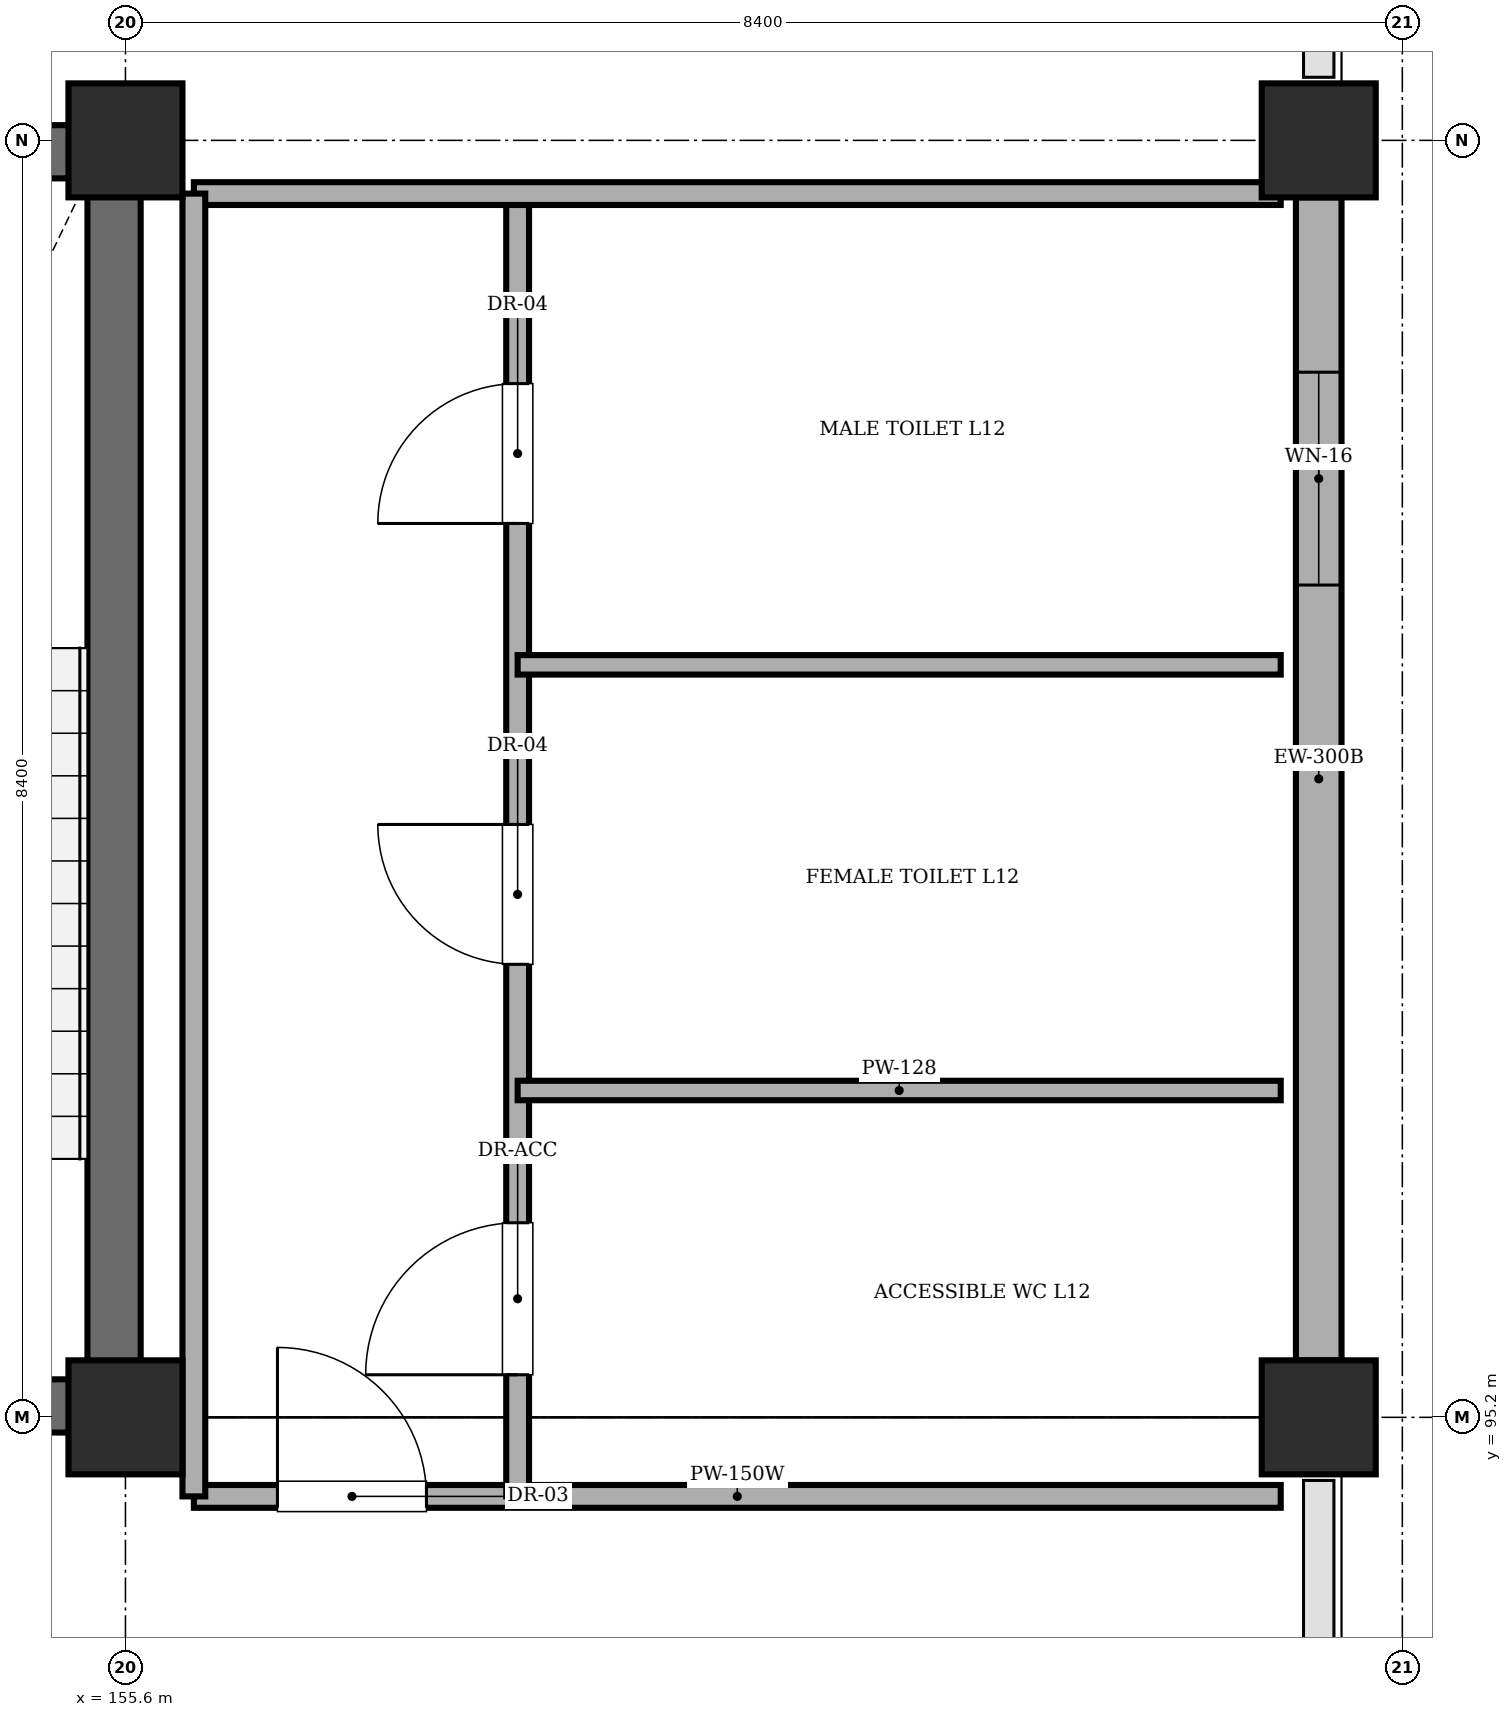
"""IFC4 building model, lengths in metres.
Left out: names, types, materials, properties, quantities, classifications, styles, units other than length and angle.
Written with IfcOpenShell. Run it as: python <this file> out.ifc"""

import sys

from ifc_helpers import new_model, si_unit, direction, frame, frame_2d, origin, origin_2d, place, context, subcontext, project, spatial, rectangle, extrude, element, fill, save


model = new_model("IFC4")
c1 = context("Model", 3, precision=1e-05, world=origin(), true_north=direction((0.0, 1.0)))
c2 = subcontext(c1, "Body", "Model", "MODEL_VIEW")
j1 = project(units=[si_unit("LENGTHUNIT", "METRE"), si_unit("PLANEANGLEUNIT", "RADIAN")], contexts=[c1])
p1 = place(None, origin())
s1 = spatial("IfcSite", under=j1, at=p1, CompositionType="ELEMENT")
p2 = place(p1, origin())
s2 = spatial("IfcBuilding", under=s1, at=p2, CompositionType="ELEMENT")
p3 = place(p2, frame((0.0, 0.0, 48.6)))
s3 = spatial("IfcBuildingStorey", under=s2, at=p3, CompositionType="ELEMENT", Elevation=48.6)
for number, where, z_axis, x_axis in (
    (1, (155.6, 95.2, 0.0), (0.0, 0.0, 1.0), (1.0, 0.0, 0.0)),
    (2, (155.6, 103.6, 0.0), (0.0, 0.0, 1.0), (1.0, 0.0, 0.0)),
    (3, (163.45, 95.2, 0.0), (0.0, 0.0, 1.0), (1.0, 0.0, 0.0)),
    (4, (163.45, 103.6, 0.0), (0.0, 0.0, 1.0), (1.0, 0.0, 0.0)),
):
    element("IfcColumn", number, at=place(p3, frame(where, z_axis=z_axis, x_axis=x_axis)), inside=s3, PredefinedType="COLUMN", context=c2, shape_type="SweptSolid", body=[
        extrude(rectangle(XDim=0.75, YDim=0.75, at=origin_2d()), origin(), (0.0, 0.0, 1.0), 4.03),
    ])
for number, where, z_axis, x_axis in (
    (5, (151.9, 95.275, 0.0), (0.0, 0.0, 1.0), (1.0, 0.0, 0.0)),
    (6, (151.9, 103.525, 0.0), (0.0, 0.0, 1.0), (1.0, 0.0, 0.0)),
):
    element("IfcWall", number, at=place(p3, frame(where, z_axis=z_axis, x_axis=x_axis)), inside=s3, PredefinedType="SHEAR", context=c2, shape_type="SweptSolid", body=[
        extrude(rectangle(XDim=3.8, YDim=0.35, at=frame_2d((1.9, 0.0))), origin(), (0.0, 0.0, 1.0), 4.03),
    ])
p4 = place(p3, frame((155.525, 95.45, 0.0), z_axis=(0.0, 0.0, 1.0), x_axis=(0.0, 1.0, 0.0)))
e7 = element("IfcWall", 7, at=p4, inside=s3, PredefinedType="SHEAR", context=c2, shape_type="SweptSolid", body=[
    extrude(rectangle(XDim=7.9, YDim=0.35, at=frame_2d((3.95, 0.0))), origin(), (0.0, 0.0, 1.0), 4.03),
])
p5 = place(p3, frame((163.45, 103.225, 0.0), z_axis=(0.0, 0.0, 1.0), x_axis=(0.0, -1.0, 0.0)))
e8 = element("IfcWall", 8, at=p5, inside=s3, PredefinedType="STANDARD", context=c2, shape_type="SweptSolid", body=[
    extrude(rectangle(XDim=7.65, YDim=0.3, at=frame_2d((3.825, 0.0))), origin(), (0.0, 0.0, 1.0), 3.33),
])
p6 = place(p5, frame((1.15, 0.0, 1.1)))
e9 = element("IfcOpeningElement", 9, at=p6, cuts=e8, PredefinedType="OPENING", context=c2, shape_type="SweptSolid", body=[
    extrude(rectangle(XDim=1.4, YDim=1.4, at=frame_2d((0.7, 0.7))), frame((0.0, 0.16, 0.0), z_axis=(0.0, -1.0, 0.0), x_axis=(1.0, 0.0, 0.0)), (0.0, 0.0, 1.0), 0.32),
])
p7 = place(p3, frame((156.05, 94.68, 0.0), z_axis=(0.0, 0.0, 1.0), x_axis=(1.0, 0.0, 0.0)))
e10 = element("IfcWall", 10, at=p7, inside=s3, PredefinedType="PARTITIONING", context=c2, shape_type="SweptSolid", body=[
    extrude(rectangle(XDim=7.15, YDim=0.15, at=frame_2d((3.575, 0.0))), origin(), (0.0, 0.0, 1.0), 4.03),
])
p8 = place(p7, frame((0.55, 0.0, 0.0)))
e11 = element("IfcOpeningElement", 11, at=p8, cuts=e10, PredefinedType="OPENING", context=c2, shape_type="SweptSolid", body=[
    extrude(rectangle(XDim=0.98, YDim=2.12, at=frame_2d((0.49, 1.06))), frame((0.0, 0.085, 0.0), z_axis=(0.0, -1.0, 0.0), x_axis=(1.0, 0.0, 0.0)), (0.0, 0.0, 1.0), 0.17),
])
p9 = place(p3, frame((158.18, 94.68, 0.0), z_axis=(0.0, 0.0, 1.0), x_axis=(0.0, 1.0, 0.0)))
e12 = element("IfcWall", 12, at=p9, inside=s3, PredefinedType="PARTITIONING", context=c2, shape_type="SweptSolid", body=[
    extrude(rectangle(XDim=8.57, YDim=0.15, at=frame_2d((4.285, 0.0))), origin(), (0.0, 0.0, 1.0), 4.03),
])
p10 = place(p9, frame((0.8, 0.0, 0.0)))
e13 = element("IfcOpeningElement", 13, at=p10, cuts=e12, PredefinedType="OPENING", context=c2, shape_type="SweptSolid", body=[
    extrude(rectangle(XDim=1.0, YDim=2.12, at=frame_2d((0.5, 1.06))), frame((0.0, 0.085, 0.0), z_axis=(0.0, -1.0, 0.0), x_axis=(1.0, 0.0, 0.0)), (0.0, 0.0, 1.0), 0.17),
])
p11 = place(p9, frame((3.5, 0.0, 0.0)))
e14 = element("IfcOpeningElement", 14, at=p11, cuts=e12, PredefinedType="OPENING", context=c2, shape_type="SweptSolid", body=[
    extrude(rectangle(XDim=0.92, YDim=2.1, at=frame_2d((0.46, 1.05))), frame((0.0, 0.085, 0.0), z_axis=(0.0, -1.0, 0.0), x_axis=(1.0, 0.0, 0.0)), (0.0, 0.0, 1.0), 0.17),
])
p12 = place(p9, frame((6.4, 0.0, 0.0)))
e15 = element("IfcOpeningElement", 15, at=p12, cuts=e12, PredefinedType="OPENING", context=c2, shape_type="SweptSolid", body=[
    extrude(rectangle(XDim=0.92, YDim=2.1, at=frame_2d((0.46, 1.05))), frame((0.0, 0.085, 0.0), z_axis=(0.0, -1.0, 0.0), x_axis=(1.0, 0.0, 0.0)), (0.0, 0.0, 1.0), 0.17),
])
for number, where, z_axis, x_axis in (
    (16, (158.18, 97.35, 0.0), (0.0, 0.0, 1.0), (1.0, 0.0, 0.0)),
    (17, (158.18, 100.15, 0.0), (0.0, 0.0, 1.0), (1.0, 0.0, 0.0)),
):
    element("IfcWall", number, at=place(p3, frame(where, z_axis=z_axis, x_axis=x_axis)), inside=s3, PredefinedType="PARTITIONING", context=c2, shape_type="SweptSolid", body=[
        extrude(rectangle(XDim=5.02, YDim=0.128, at=frame_2d((2.51, 0.0))), origin(), (0.0, 0.0, 1.0), 4.03),
    ])
p13 = place(p3, frame((156.05, 103.25, 0.0), z_axis=(0.0, 0.0, 1.0), x_axis=(1.0, 0.0, 0.0)))
e18 = element("IfcWall", 18, at=p13, inside=s3, PredefinedType="PARTITIONING", context=c2, shape_type="SweptSolid", body=[
    extrude(rectangle(XDim=7.15, YDim=0.15, at=frame_2d((3.575, 0.0))), origin(), (0.0, 0.0, 1.0), 4.03),
])
p14 = place(p3, frame((156.05, 94.68, 0.0), z_axis=(0.0, 0.0, 1.0), x_axis=(0.0, 1.0, 0.0)))
e19 = element("IfcWall", 19, at=p14, inside=s3, PredefinedType="PARTITIONING", context=c2, shape_type="SweptSolid", body=[
    extrude(rectangle(XDim=8.57, YDim=0.15, at=frame_2d((4.285, 0.0))), origin(), (0.0, 0.0, 1.0), 4.03),
])
p15 = place(p6, origin())
e20 = element("IfcWindow", 20, at=p15, inside=s3, PartitioningType="SINGLE_PANEL", PredefinedType="WINDOW", context=c2, shape_type="SweptSolid", body=[
    extrude(rectangle(XDim=1.4, YDim=1.4, at=frame_2d((0.7, 0.7))), frame((0.0, 0.03, 0.0), z_axis=(0.0, -1.0, 0.0), x_axis=(1.0, 0.0, 0.0)), (0.0, 0.0, 1.0), 0.06),
])
fill(e9, e20)
p16 = place(p8, origin())
e21 = element("IfcDoor", 21, at=p16, inside=s3, OperationType="SINGLE_SWING_LEFT", PredefinedType="DOOR", context=c2, shape_type="SweptSolid", body=[
    extrude(rectangle(XDim=0.98, YDim=2.12, at=frame_2d((0.49, 1.06))), frame((0.0, 0.025, 0.0), z_axis=(0.0, -1.0, 0.0), x_axis=(1.0, 0.0, 0.0)), (0.0, 0.0, 1.0), 0.05),
])
fill(e11, e21)
p17 = place(p10, origin())
e22 = element("IfcDoor", 22, at=p17, inside=s3, OperationType="SINGLE_SWING_LEFT", PredefinedType="DOOR", context=c2, shape_type="SweptSolid", body=[
    extrude(rectangle(XDim=1.0, YDim=2.12, at=frame_2d((0.5, 1.06))), frame((0.0, 0.025, 0.0), z_axis=(0.0, -1.0, 0.0), x_axis=(1.0, 0.0, 0.0)), (0.0, 0.0, 1.0), 0.05),
])
fill(e13, e22)
p18 = place(p11, origin())
e23 = element("IfcDoor", 23, at=p18, inside=s3, OperationType="SINGLE_SWING_RIGHT", PredefinedType="DOOR", context=c2, shape_type="SweptSolid", body=[
    extrude(rectangle(XDim=0.92, YDim=2.1, at=frame_2d((0.46, 1.05))), frame((0.0, 0.025, 0.0), z_axis=(0.0, -1.0, 0.0), x_axis=(1.0, 0.0, 0.0)), (0.0, 0.0, 1.0), 0.05),
])
fill(e14, e23)
p19 = place(p12, origin())
e24 = element("IfcDoor", 24, at=p19, inside=s3, OperationType="SINGLE_SWING_LEFT", PredefinedType="DOOR", context=c2, shape_type="SweptSolid", body=[
    extrude(rectangle(XDim=0.92, YDim=2.1, at=frame_2d((0.46, 1.05))), frame((0.0, 0.025, 0.0), z_axis=(0.0, -1.0, 0.0), x_axis=(1.0, 0.0, 0.0)), (0.0, 0.0, 1.0), 0.05),
])
fill(e15, e24)
save(model, sys.argv[1])
